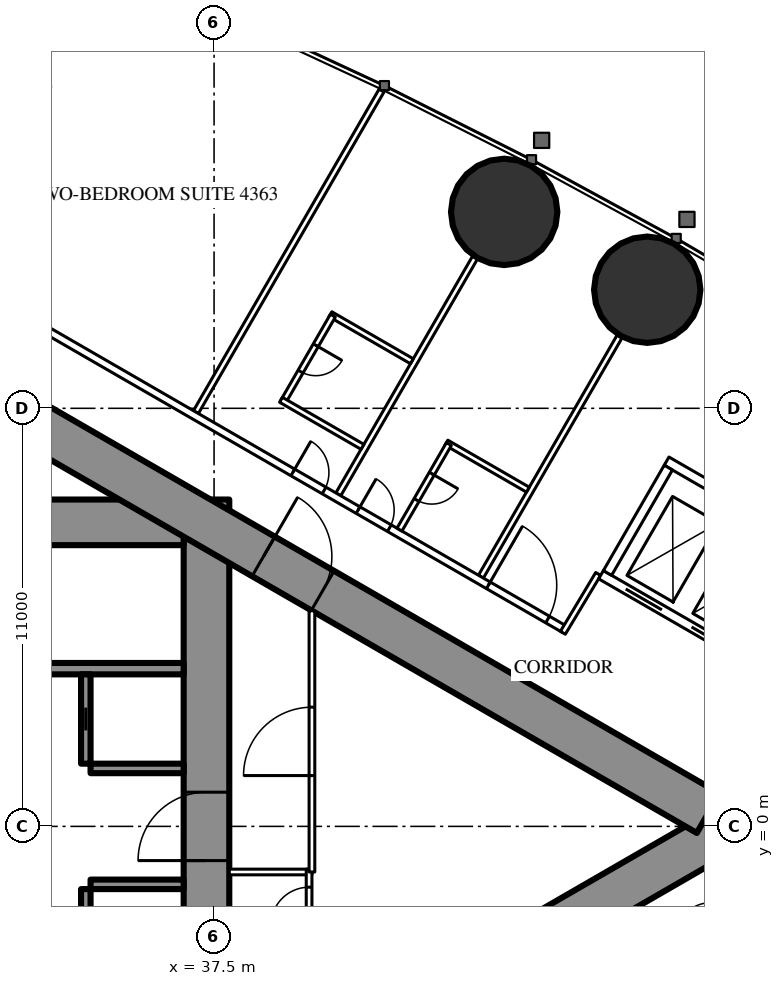
"""IFC4 building model, lengths in metres.
Left out: names, types, materials, properties, quantities, classifications, styles, units other than length and angle.
Written with IfcOpenShell. Run it as: python <this file> out.ifc"""

import sys

from ifc_helpers import new_model, si_unit, direction, frame, frame_2d, origin, origin_2d, place, context, subcontext, project, spatial, rectangle, circle, extrude, element, fill, save


model = new_model("IFC4")
c1 = context("Model", 3, precision=1e-05, world=origin(), true_north=direction((0.0, 1.0)))
c2 = subcontext(c1, "Body", "Model", "MODEL_VIEW")
j1 = project(units=[si_unit("LENGTHUNIT", "METRE"), si_unit("PLANEANGLEUNIT", "RADIAN")], contexts=[c1])
p1 = place(None, origin())
s1 = spatial("IfcSite", under=j1, at=p1, CompositionType="ELEMENT")
p2 = place(p1, origin())
s2 = spatial("IfcBuilding", under=s1, at=p2, CompositionType="ELEMENT")
p3 = place(p2, frame((0.0, 0.0, 163.3)))
s3 = spatial("IfcBuildingStorey", under=s2, at=p3, CompositionType="ELEMENT", Elevation=163.3)
for number, where, z_axis, x_axis in (
    (1, (48.897, 14.121, 0.0), (0.0, 0.0, 1.0), (1.0, 0.0, 0.0)),
    (2, (45.134, 16.168, 0.0), (0.0, 0.0, 1.0), (1.0, 0.0, 0.0)),
):
    element("IfcColumn", number, at=place(p3, frame(where, z_axis=z_axis, x_axis=x_axis)), inside=s3, PredefinedType="COLUMN", context=c2, shape_type="SweptSolid", body=[
        extrude(circle(Radius=1.4, at=origin_2d()), origin(), (0.0, 0.0, 1.0), 3.5),
    ])
p4 = place(p3, frame((37.3, -8.6, 0.0), z_axis=(0.0, 0.0, 1.0), x_axis=(0.0, 1.0, 0.0)))
e3 = element("IfcWall", 3, at=p4, inside=s3, PredefinedType="SHEAR", context=c2, shape_type="SweptSolid", body=[
    extrude(rectangle(XDim=17.2, YDim=1.2, at=frame_2d((8.6, 0.0))), origin(), (0.0, 0.0, 1.0), 3.5),
])
p5 = place(p4, frame((7.7, 0.0, 0.0)))
e4 = element("IfcOpeningElement", 4, at=p5, cuts=e3, PredefinedType="OPENING", context=c2, shape_type="SweptSolid", body=[
    extrude(rectangle(XDim=1.8, YDim=2.2, at=frame_2d((0.9, 1.1))), frame((0.0, 0.61, 0.0), z_axis=(0.0, -1.0, 0.0), x_axis=(1.0, 0.0, 0.0)), (0.0, 0.0, 1.0), 1.22),
])
p6 = place(p3, frame((28.3, 8.0, 0.0), z_axis=(0.0, 0.0, 1.0), x_axis=(1.0, 0.0, 0.0)))
e5 = element("IfcWall", 5, at=p6, inside=s3, PredefinedType="SHEAR", context=c2, shape_type="SweptSolid", body=[
    extrude(rectangle(XDim=8.4, YDim=1.2, at=frame_2d((4.2, 0.0))), origin(), (0.0, 0.0, 1.0), 3.5),
])
p7 = place(p6, frame((0.25, 0.0, 0.0)))
e6 = element("IfcOpeningElement", 6, at=p7, cuts=e5, PredefinedType="OPENING", context=c2, shape_type="SweptSolid", body=[
    extrude(rectangle(XDim=1.0, YDim=2.2, at=frame_2d((0.5, 1.1))), frame((0.0, 0.61, 0.0), z_axis=(0.0, -1.0, 0.0), x_axis=(1.0, 0.0, 0.0)), (0.0, 0.0, 1.0), 1.22),
])
p8 = place(p3, frame((28.3, 4.15, 0.0), z_axis=(0.0, 0.0, 1.0), x_axis=(1.0, 0.0, 0.0)))
e7 = element("IfcWall", 7, at=p8, inside=s3, PredefinedType="SHEAR", context=c2, shape_type="SweptSolid", body=[
    extrude(rectangle(XDim=8.4, YDim=0.3, at=frame_2d((4.2, 0.0))), origin(), (0.0, 0.0, 1.0), 3.5),
])
p9 = place(p3, frame((34.125, -4.0, 0.0), z_axis=(0.0, 0.0, 1.0), x_axis=(0.0, 1.0, 0.0)))
e8 = element("IfcWall", 8, at=p9, inside=s3, PredefinedType="SHEAR", context=c2, shape_type="SweptSolid", body=[
    extrude(rectangle(XDim=2.35, YDim=0.25, at=frame_2d((1.175, 0.0))), origin(), (0.0, 0.0, 1.0), 3.5),
])
p10 = place(p9, frame((0.875, 0.0, 0.0)))
e9 = element("IfcOpeningElement", 9, at=p10, cuts=e8, PredefinedType="OPENING", context=c2, shape_type="SweptSolid", body=[
    extrude(rectangle(XDim=0.6, YDim=2.0, at=frame_2d((0.3, 1.0))), frame((0.0, 0.135, 0.0), z_axis=(0.0, -1.0, 0.0), x_axis=(1.0, 0.0, 0.0)), (0.0, 0.0, 1.0), 0.27),
])
p11 = place(p3, frame((34.25, -1.525, 0.0), z_axis=(0.0, 0.0, 1.0), x_axis=(1.0, 0.0, 0.0)))
e10 = element("IfcWall", 10, at=p11, inside=s3, PredefinedType="SHEAR", context=c2, shape_type="SweptSolid", body=[
    extrude(rectangle(XDim=2.45, YDim=0.25, at=frame_2d((1.225, 0.0))), origin(), (0.0, 0.0, 1.0), 3.5),
])
p12 = place(p3, frame((34.125, 1.65, 0.0), z_axis=(0.0, 0.0, 1.0), x_axis=(0.0, 1.0, 0.0)))
e11 = element("IfcWall", 11, at=p12, inside=s3, PredefinedType="SHEAR", context=c2, shape_type="SweptSolid", body=[
    extrude(rectangle(XDim=2.35, YDim=0.25, at=frame_2d((1.175, 0.0))), origin(), (0.0, 0.0, 1.0), 3.5),
])
p13 = place(p12, frame((0.875, 0.0, 0.0)))
e12 = element("IfcOpeningElement", 12, at=p13, cuts=e11, PredefinedType="OPENING", context=c2, shape_type="SweptSolid", body=[
    extrude(rectangle(XDim=0.6, YDim=2.0, at=frame_2d((0.3, 1.0))), frame((0.0, 0.135, 0.0), z_axis=(0.0, -1.0, 0.0), x_axis=(1.0, 0.0, 0.0)), (0.0, 0.0, 1.0), 0.27),
])
p14 = place(p3, frame((34.25, 1.525, 0.0), z_axis=(0.0, 0.0, 1.0), x_axis=(1.0, 0.0, 0.0)))
e13 = element("IfcWall", 13, at=p14, inside=s3, PredefinedType="SHEAR", context=c2, shape_type="SweptSolid", body=[
    extrude(rectangle(XDim=2.45, YDim=0.25, at=frame_2d((1.225, 0.0))), origin(), (0.0, 0.0, 1.0), 3.5),
])
p15 = place(p3, frame((27.2, -13.8, 0.0), z_axis=(0.0, 0.0, 1.0), x_axis=(0.866027159892, 0.499996958321, 0.0)))
e14 = element("IfcWall", 14, at=p15, inside=s3, PredefinedType="SHEAR", context=c2, shape_type="SweptSolid", body=[
    extrude(rectangle(XDim=27.947, YDim=1.2, at=frame_2d((13.973, 0.0))), origin(), (0.0, 0.0, 1.0), 3.5),
])
p16 = place(p15, frame((4.6, 0.0, 0.0)))
e15 = element("IfcOpeningElement", 15, at=p16, cuts=e14, PredefinedType="OPENING", context=c2, shape_type="SweptSolid", body=[
    extrude(rectangle(XDim=1.0, YDim=2.2, at=frame_2d((0.5, 1.1))), frame((0.0, 0.61, 0.0), z_axis=(0.0, -1.0, 0.0), x_axis=(1.0, 0.0, 0.0)), (0.0, 0.0, 1.0), 1.22),
])
p17 = place(p15, frame((13.395, 0.0, 0.0)))
e16 = element("IfcOpeningElement", 16, at=p17, cuts=e14, PredefinedType="OPENING", context=c2, shape_type="SweptSolid", body=[
    extrude(rectangle(XDim=1.8, YDim=2.2, at=frame_2d((0.9, 1.1))), frame((0.0, 0.61, 0.0), z_axis=(0.0, -1.0, 0.0), x_axis=(1.0, 0.0, 0.0)), (0.0, 0.0, 1.0), 1.22),
])
p18 = place(p3, frame((27.2, 13.8, 0.0), z_axis=(0.0, 0.0, 1.0), x_axis=(0.866024515034, -0.500001539357, 0.0)))
e17 = element("IfcWall", 17, at=p18, inside=s3, PredefinedType="SHEAR", context=c2, shape_type="SweptSolid", body=[
    extrude(rectangle(XDim=26.907, YDim=1.2, at=frame_2d((13.454, 0.0))), origin(), (0.0, 0.0, 1.0), 3.5),
])
p19 = place(p18, frame((4.6, 0.0, 0.0)))
e18 = element("IfcOpeningElement", 18, at=p19, cuts=e17, PredefinedType="OPENING", context=c2, shape_type="SweptSolid", body=[
    extrude(rectangle(XDim=1.0, YDim=2.2, at=frame_2d((0.5, 1.1))), frame((0.0, 0.61, 0.0), z_axis=(0.0, -1.0, 0.0), x_axis=(1.0, 0.0, 0.0)), (0.0, 0.0, 1.0), 1.22),
])
p20 = place(p18, frame((13.395, 0.0, 0.0)))
e19 = element("IfcOpeningElement", 19, at=p20, cuts=e17, PredefinedType="OPENING", context=c2, shape_type="SweptSolid", body=[
    extrude(rectangle(XDim=1.8, YDim=2.2, at=frame_2d((0.9, 1.1))), frame((0.0, 0.61, 0.0), z_axis=(0.0, -1.0, 0.0), x_axis=(1.0, 0.0, 0.0)), (0.0, 0.0, 1.0), 1.22),
])
p21 = place(p3, frame((37.022, 10.9, 0.0), z_axis=(0.0, 0.0, 1.0), x_axis=(0.499998620953, 0.866026199976, 0.0)))
e20 = element("IfcWall", 20, at=p21, inside=s3, PredefinedType="PARTITIONING", context=c2, shape_type="SweptSolid", body=[
    extrude(rectangle(XDim=9.77, YDim=0.15, at=frame_2d((4.885, 0.0))), origin(), (0.0, 0.0, 1.0), 3.25),
])
p22 = place(p3, frame((40.769, 8.737, 0.0), z_axis=(0.0, 0.0, 1.0), x_axis=(0.500013115284, 0.866017831539, 0.0)))
e21 = element("IfcWall", 21, at=p22, inside=s3, PredefinedType="PARTITIONING", context=c2, shape_type="SweptSolid", body=[
    extrude(rectangle(XDim=7.198, YDim=0.15, at=frame_2d((3.599, 0.0))), origin(), (0.0, 0.0, 1.0), 2.3),
])
p23 = place(p3, frame((44.521, 6.571, 0.0), z_axis=(0.0, 0.0, 1.0), x_axis=(0.500020376429, 0.866013639128, 0.0)))
e22 = element("IfcWall", 22, at=p23, inside=s3, PredefinedType="PARTITIONING", context=c2, shape_type="SweptSolid", body=[
    extrude(rectangle(XDim=7.306, YDim=0.15, at=frame_2d((3.653, 0.0))), origin(), (0.0, 0.0, 1.0), 2.3),
])
p24 = place(p3, frame((27.959, 16.017, 0.0), z_axis=(0.0, 0.0, 1.0), x_axis=(0.866027146794, -0.499996981007, 0.0)))
e23 = element("IfcWall", 23, at=p24, inside=s3, PredefinedType="PARTITIONING", context=c2, shape_type="SweptSolid", body=[
    extrude(rectangle(XDim=21.657, YDim=0.2, at=frame_2d((10.829, 0.0))), origin(), (0.0, 0.0, 1.0), 3.25),
])
p25 = place(p24, frame((15.391, 0.0, 0.0)))
e24 = element("IfcOpeningElement", 24, at=p25, cuts=e23, PredefinedType="OPENING", context=c2, shape_type="SweptSolid", body=[
    extrude(rectangle(XDim=0.95, YDim=2.2, at=frame_2d((0.475, 1.1))), frame((0.0, 0.11, 0.0), z_axis=(0.0, -1.0, 0.0), x_axis=(1.0, 0.0, 0.0)), (0.0, 0.0, 1.0), 0.22),
])
p26 = place(p24, frame((13.409, 0.0, 0.0)))
e25 = element("IfcOpeningElement", 25, at=p26, cuts=e23, PredefinedType="OPENING", context=c2, shape_type="SweptSolid", body=[
    extrude(rectangle(XDim=0.95, YDim=2.2, at=frame_2d((0.475, 1.1))), frame((0.0, 0.11, 0.0), z_axis=(0.0, -1.0, 0.0), x_axis=(1.0, 0.0, 0.0)), (0.0, 0.0, 1.0), 0.22),
])
p27 = place(p24, frame((0.6, 0.0, 0.0)))
e26 = element("IfcOpeningElement", 26, at=p27, cuts=e23, PredefinedType="OPENING", context=c2, shape_type="SweptSolid", body=[
    extrude(rectangle(XDim=0.95, YDim=2.2, at=frame_2d((0.475, 1.1))), frame((0.0, 0.11, 0.0), z_axis=(0.0, -1.0, 0.0), x_axis=(1.0, 0.0, 0.0)), (0.0, 0.0, 1.0), 0.22),
])
p28 = place(p24, frame((19.349, 0.0, 0.0)))
e27 = element("IfcOpeningElement", 27, at=p28, cuts=e23, PredefinedType="OPENING", context=c2, shape_type="SweptSolid", body=[
    extrude(rectangle(XDim=1.8, YDim=2.2, at=frame_2d((0.9, 1.1))), frame((0.0, 0.11, 0.0), z_axis=(0.0, -1.0, 0.0), x_axis=(1.0, 0.0, 0.0)), (0.0, 0.0, 1.0), 0.22),
])
p29 = place(p3, frame((47.606, 6.643, 0.0), z_axis=(0.0, 0.0, 1.0), x_axis=(-0.514237157483, -0.857648031458, 0.0)))
e28 = element("IfcWall", 28, at=p29, inside=s3, PredefinedType="PARTITIONING", context=c2, shape_type="SweptSolid", body=[
    extrude(rectangle(XDim=1.805, YDim=0.15, at=frame_2d((0.902, 0.0))), origin(), (0.0, 0.0, 1.0), 3.25),
])
p30 = place(p3, frame((40.741, -8.638, 0.0), z_axis=(0.0, 0.0, 1.0), x_axis=(0.866022967338, 0.500004220025, 0.0)))
e29 = element("IfcWall", 29, at=p30, inside=s3, PredefinedType="PARTITIONING", context=c2, shape_type="SweptSolid", body=[
    extrude(rectangle(XDim=17.276, YDim=0.2, at=frame_2d((8.638, 0.0))), origin(), (0.0, 0.0, 1.0), 3.25),
])
p31 = place(p30, frame((7.316, 0.0, 0.0)))
e30 = element("IfcOpeningElement", 30, at=p31, cuts=e29, PredefinedType="OPENING", context=c2, shape_type="SweptSolid", body=[
    extrude(rectangle(XDim=0.95, YDim=2.2, at=frame_2d((0.475, 1.1))), frame((0.0, 0.11, 0.0), z_axis=(0.0, -1.0, 0.0), x_axis=(1.0, 0.0, 0.0)), (0.0, 0.0, 1.0), 0.22),
])
p32 = place(p30, frame((11.366, 0.0, 0.0)))
e31 = element("IfcOpeningElement", 31, at=p32, cuts=e29, PredefinedType="OPENING", context=c2, shape_type="SweptSolid", body=[
    extrude(rectangle(XDim=0.95, YDim=2.2, at=frame_2d((0.475, 1.1))), frame((0.0, 0.11, 0.0), z_axis=(0.0, -1.0, 0.0), x_axis=(1.0, 0.0, 0.0)), (0.0, 0.0, 1.0), 0.22),
])
p33 = place(p30, frame((13.347, 0.0, 0.0)))
e32 = element("IfcOpeningElement", 32, at=p33, cuts=e29, PredefinedType="OPENING", context=c2, shape_type="SweptSolid", body=[
    extrude(rectangle(XDim=0.95, YDim=2.2, at=frame_2d((0.475, 1.1))), frame((0.0, 0.11, 0.0), z_axis=(0.0, -1.0, 0.0), x_axis=(1.0, 0.0, 0.0)), (0.0, 0.0, 1.0), 0.22),
])
p34 = place(p3, frame((43.613, 10.097, 0.0), z_axis=(0.0, 0.0, 1.0), x_axis=(0.866031185235, -0.4999899861, 0.0)))
e33 = element("IfcWall", 33, at=p34, inside=s3, PredefinedType="PARTITIONING", context=c2, shape_type="SweptSolid", body=[
    extrude(rectangle(XDim=2.475, YDim=0.15, at=frame_2d((1.238, 0.0))), origin(), (0.0, 0.0, 1.0), 3.25),
])
p35 = place(p3, frame((42.378, 7.808, 0.0), z_axis=(0.0, 0.0, 1.0), x_axis=(0.500006934395, 0.866021400173, 0.0)))
e34 = element("IfcWall", 34, at=p35, inside=s3, PredefinedType="PARTITIONING", context=c2, shape_type="SweptSolid", body=[
    extrude(rectangle(XDim=2.6, YDim=0.15, at=frame_2d((1.3, 0.0))), origin(), (0.0, 0.0, 1.0), 3.25),
])
p36 = place(p35, frame((0.9, 0.0, 0.0)))
e35 = element("IfcOpeningElement", 35, at=p36, cuts=e34, PredefinedType="OPENING", context=c2, shape_type="SweptSolid", body=[
    extrude(rectangle(XDim=0.8, YDim=2.2, at=frame_2d((0.4, 1.1))), frame((0.0, 0.085, 0.0), z_axis=(0.0, -1.0, 0.0), x_axis=(1.0, 0.0, 0.0)), (0.0, 0.0, 1.0), 0.17),
])
p37 = place(p3, frame((40.561, 13.476, 0.0), z_axis=(0.0, 0.0, 1.0), x_axis=(0.866006523861, -0.500032699561, 0.0)))
e36 = element("IfcWall", 36, at=p37, inside=s3, PredefinedType="PARTITIONING", context=c2, shape_type="SweptSolid", body=[
    extrude(rectangle(XDim=2.475, YDim=0.15, at=frame_2d((1.237, 0.0))), origin(), (0.0, 0.0, 1.0), 3.25),
])
p38 = place(p3, frame((39.326, 11.187, 0.0), z_axis=(0.0, 0.0, 1.0), x_axis=(0.500047596559, 0.865997922154, 0.0)))
e37 = element("IfcWall", 37, at=p38, inside=s3, PredefinedType="PARTITIONING", context=c2, shape_type="SweptSolid", body=[
    extrude(rectangle(XDim=2.6, YDim=0.15, at=frame_2d((1.3, 0.0))), origin(), (0.0, 0.0, 1.0), 3.25),
])
p39 = place(p38, frame((0.9, 0.0, 0.0)))
e38 = element("IfcOpeningElement", 38, at=p39, cuts=e37, PredefinedType="OPENING", context=c2, shape_type="SweptSolid", body=[
    extrude(rectangle(XDim=0.8, YDim=2.2, at=frame_2d((0.4, 1.1))), frame((0.0, 0.085, 0.0), z_axis=(0.0, -1.0, 0.0), x_axis=(1.0, 0.0, 0.0)), (0.0, 0.0, 1.0), 0.17),
])
p40 = place(p3, frame((39.261, 11.224, 0.0), z_axis=(0.0, 0.0, 1.0), x_axis=(0.866006523861, -0.500032699561, 0.0)))
e39 = element("IfcWall", 39, at=p40, inside=s3, PredefinedType="PARTITIONING", context=c2, shape_type="SweptSolid", body=[
    extrude(rectangle(XDim=2.475, YDim=0.15, at=frame_2d((1.237, 0.0))), origin(), (0.0, 0.0, 1.0), 3.25),
])
p41 = place(p3, frame((37.9, -1.2, 0.0), z_axis=(0.0, 0.0, 1.0), x_axis=(1.0, 0.0, 0.0)))
e40 = element("IfcWall", 40, at=p41, inside=s3, PredefinedType="PARTITIONING", context=c2, shape_type="SweptSolid", body=[
    extrude(rectangle(XDim=2.175, YDim=0.15, at=frame_2d((1.087, 0.0))), origin(), (0.0, 0.0, 1.0), 3.25),
])
p42 = place(p3, frame((40.0, -3.075, 0.0), z_axis=(0.0, 0.0, 1.0), x_axis=(0.0, 1.0, 0.0)))
e41 = element("IfcWall", 41, at=p42, inside=s3, PredefinedType="PARTITIONING", context=c2, shape_type="SweptSolid", body=[
    extrude(rectangle(XDim=1.95, YDim=0.15, at=frame_2d((0.975, 0.0))), origin(), (0.0, 0.0, 1.0), 3.25),
])
p43 = place(p42, frame((0.475, 0.0, 0.0)))
e42 = element("IfcOpeningElement", 42, at=p43, cuts=e41, PredefinedType="OPENING", context=c2, shape_type="SweptSolid", body=[
    extrude(rectangle(XDim=1.0, YDim=2.2, at=frame_2d((0.5, 1.1))), frame((0.0, 0.085, 0.0), z_axis=(0.0, -1.0, 0.0), x_axis=(1.0, 0.0, 0.0)), (0.0, 0.0, 1.0), 0.17),
])
p44 = place(p3, frame((40.075, -1.2, 0.0), z_axis=(0.0, 0.0, 1.0), x_axis=(0.0, 1.0, 0.0)))
e43 = element("IfcWall", 43, at=p44, inside=s3, PredefinedType="PARTITIONING", context=c2, shape_type="SweptSolid", body=[
    extrude(rectangle(XDim=6.874, YDim=0.15, at=frame_2d((3.437, 0.0))), origin(), (0.0, 0.0, 1.0), 3.25),
])
p45 = place(p44, frame((2.537, 0.0, 0.0)))
e44 = element("IfcOpeningElement", 44, at=p45, cuts=e43, PredefinedType="OPENING", context=c2, shape_type="SweptSolid", body=[
    extrude(rectangle(XDim=1.8, YDim=2.2, at=frame_2d((0.9, 1.1))), frame((0.0, 0.085, 0.0), z_axis=(0.0, -1.0, 0.0), x_axis=(1.0, 0.0, 0.0)), (0.0, 0.0, 1.0), 0.17),
])
p46 = place(p3, frame((47.681, 6.622, 0.0), z_axis=(0.0, 0.0, 1.0), x_axis=(0.86603344179, -0.499986077507, 0.0)))
e45 = element("IfcWall", 45, at=p46, inside=s3, PredefinedType="PARTITIONING", context=c2, shape_type="SweptSolid", body=[
    extrude(rectangle(XDim=6.6, YDim=0.25, at=frame_2d((3.3, 0.0))), origin(), (0.0, 0.0, 1.0), 3.25),
])
p47 = place(p46, frame((0.75, 0.0, 0.0)))
e46 = element("IfcOpeningElement", 46, at=p47, cuts=e45, PredefinedType="OPENING", context=c2, shape_type="SweptSolid", body=[
    extrude(rectangle(XDim=1.1, YDim=2.2, at=frame_2d((0.55, 1.1))), frame((0.0, 0.135, 0.0), z_axis=(0.0, -1.0, 0.0), x_axis=(1.0, 0.0, 0.0)), (0.0, 0.0, 1.0), 0.27),
])
p48 = place(p46, frame((2.75, 0.0, 0.0)))
e47 = element("IfcOpeningElement", 47, at=p48, cuts=e45, PredefinedType="OPENING", context=c2, shape_type="SweptSolid", body=[
    extrude(rectangle(XDim=1.1, YDim=2.2, at=frame_2d((0.55, 1.1))), frame((0.0, 0.135, 0.0), z_axis=(0.0, -1.0, 0.0), x_axis=(1.0, 0.0, 0.0)), (0.0, 0.0, 1.0), 0.27),
])
p49 = place(p46, frame((4.75, 0.0, 0.0)))
e48 = element("IfcOpeningElement", 48, at=p49, cuts=e45, PredefinedType="OPENING", context=c2, shape_type="SweptSolid", body=[
    extrude(rectangle(XDim=1.1, YDim=2.2, at=frame_2d((0.55, 1.1))), frame((0.0, 0.135, 0.0), z_axis=(0.0, -1.0, 0.0), x_axis=(1.0, 0.0, 0.0)), (0.0, 0.0, 1.0), 0.27),
])
p50 = place(p3, frame((49.406, 9.611, 0.0), z_axis=(0.0, 0.0, 1.0), x_axis=(0.86603344179, -0.499986077507, 0.0)))
e49 = element("IfcWall", 49, at=p50, inside=s3, PredefinedType="PARTITIONING", context=c2, shape_type="SweptSolid", body=[
    extrude(rectangle(XDim=6.6, YDim=0.25, at=frame_2d((3.3, 0.0))), origin(), (0.0, 0.0, 1.0), 3.25),
])
p51 = place(p3, frame((47.852, 6.668, 0.0), z_axis=(0.0, 0.0, 1.0), x_axis=(0.499929347863, 0.866066190972, 0.0)))
e50 = element("IfcWall", 50, at=p51, inside=s3, PredefinedType="PARTITIONING", context=c2, shape_type="SweptSolid", body=[
    extrude(rectangle(XDim=3.201, YDim=0.25, at=frame_2d((1.6, 0.0))), origin(), (0.0, 0.0, 1.0), 3.25),
])
p52 = place(p36, origin())
e51 = element("IfcDoor", 51, at=p52, inside=s3, OperationType="SINGLE_SWING_RIGHT", PredefinedType="DOOR", context=c2, shape_type="SweptSolid", body=[
    extrude(rectangle(XDim=0.8, YDim=2.2, at=frame_2d((0.4, 1.1))), frame((0.0, 0.025, 0.0), z_axis=(0.0, -1.0, 0.0), x_axis=(1.0, 0.0, 0.0)), (0.0, 0.0, 1.0), 0.05),
])
fill(e35, e51)
p53 = place(p25, origin())
e52 = element("IfcDoor", 52, at=p53, inside=s3, OperationType="SINGLE_SWING_LEFT", PredefinedType="DOOR", context=c2, shape_type="SweptSolid", body=[
    extrude(rectangle(XDim=0.95, YDim=2.2, at=frame_2d((0.475, 1.1))), frame((0.0, 0.025, 0.0), z_axis=(0.0, -1.0, 0.0), x_axis=(1.0, 0.0, 0.0)), (0.0, 0.0, 1.0), 0.05),
])
fill(e24, e52)
p54 = place(p39, origin())
e53 = element("IfcDoor", 53, at=p54, inside=s3, OperationType="SINGLE_SWING_RIGHT", PredefinedType="DOOR", context=c2, shape_type="SweptSolid", body=[
    extrude(rectangle(XDim=0.8, YDim=2.2, at=frame_2d((0.4, 1.1))), frame((0.0, 0.025, 0.0), z_axis=(0.0, -1.0, 0.0), x_axis=(1.0, 0.0, 0.0)), (0.0, 0.0, 1.0), 0.05),
])
fill(e38, e53)
p55 = place(p26, origin())
e54 = element("IfcDoor", 54, at=p55, inside=s3, OperationType="SINGLE_SWING_LEFT", PredefinedType="DOOR", context=c2, shape_type="SweptSolid", body=[
    extrude(rectangle(XDim=0.95, YDim=2.2, at=frame_2d((0.475, 1.1))), frame((0.0, 0.025, 0.0), z_axis=(0.0, -1.0, 0.0), x_axis=(1.0, 0.0, 0.0)), (0.0, 0.0, 1.0), 0.05),
])
fill(e25, e54)
p56 = place(p28, origin())
e55 = element("IfcDoor", 55, at=p56, inside=s3, OperationType="DOUBLE_DOOR_SINGLE_SWING", PredefinedType="DOOR", context=c2, shape_type="SweptSolid", body=[
    extrude(rectangle(XDim=1.8, YDim=2.2, at=frame_2d((0.9, 1.1))), frame((0.0, 0.025, 0.0), z_axis=(0.0, -1.0, 0.0), x_axis=(1.0, 0.0, 0.0)), (0.0, 0.0, 1.0), 0.05),
])
fill(e27, e55)
p57 = place(p43, origin())
e56 = element("IfcDoor", 56, at=p57, inside=s3, OperationType="SINGLE_SWING_LEFT", PredefinedType="DOOR", context=c2, shape_type="SweptSolid", body=[
    extrude(rectangle(XDim=1.0, YDim=2.2, at=frame_2d((0.5, 1.1))), frame((0.0, 0.025, 0.0), z_axis=(0.0, -1.0, 0.0), x_axis=(1.0, 0.0, 0.0)), (0.0, 0.0, 1.0), 0.05),
])
fill(e42, e56)
p58 = place(p45, origin())
e57 = element("IfcDoor", 57, at=p58, inside=s3, OperationType="DOUBLE_DOOR_SINGLE_SWING", PredefinedType="DOOR", context=c2, shape_type="SweptSolid", body=[
    extrude(rectangle(XDim=1.8, YDim=2.2, at=frame_2d((0.9, 1.1))), frame((0.0, 0.025, 0.0), z_axis=(0.0, -1.0, 0.0), x_axis=(1.0, 0.0, 0.0)), (0.0, 0.0, 1.0), 0.05),
])
fill(e44, e57)
p59 = place(p20, origin())
e58 = element("IfcDoor", 58, at=p59, inside=s3, OperationType="DOUBLE_DOOR_SINGLE_SWING", PredefinedType="DOOR", context=c2, shape_type="SweptSolid", body=[
    extrude(rectangle(XDim=1.8, YDim=2.2, at=frame_2d((0.9, 1.1))), frame((0.0, 0.025, 0.0), z_axis=(0.0, -1.0, 0.0), x_axis=(1.0, 0.0, 0.0)), (0.0, 0.0, 1.0), 0.05),
])
fill(e19, e58)
p60 = place(p5, origin())
e59 = element("IfcDoor", 59, at=p60, inside=s3, OperationType="DOUBLE_DOOR_SINGLE_SWING", PredefinedType="DOOR", context=c2, shape_type="SweptSolid", body=[
    extrude(rectangle(XDim=1.8, YDim=2.2, at=frame_2d((0.9, 1.1))), frame((0.0, 0.025, 0.0), z_axis=(0.0, -1.0, 0.0), x_axis=(1.0, 0.0, 0.0)), (0.0, 0.0, 1.0), 0.05),
])
fill(e4, e59)
p61 = place(p13, origin())
e60 = element("IfcDoor", 60, at=p61, inside=s3, OperationType="SLIDING_TO_LEFT", PredefinedType="DOOR", context=c2, shape_type="SweptSolid", body=[
    extrude(rectangle(XDim=0.6, YDim=2.0, at=frame_2d((0.3, 1.0))), frame((0.0, 0.025, 0.0), z_axis=(0.0, -1.0, 0.0), x_axis=(1.0, 0.0, 0.0)), (0.0, 0.0, 1.0), 0.05),
])
fill(e12, e60)
p62 = place(p47, origin())
e61 = element("IfcDoor", 61, at=p62, inside=s3, OperationType="DOUBLE_DOOR_SLIDING", PredefinedType="USERDEFINED", context=c2, shape_type="SweptSolid", body=[
    extrude(rectangle(XDim=1.1, YDim=2.2, at=frame_2d((0.55, 1.1))), frame((0.0, 0.025, 0.0), z_axis=(0.0, -1.0, 0.0), x_axis=(1.0, 0.0, 0.0)), (0.0, 0.0, 1.0), 0.05),
])
fill(e46, e61)
p63 = place(p48, origin())
e62 = element("IfcDoor", 62, at=p63, inside=s3, OperationType="DOUBLE_DOOR_SLIDING", PredefinedType="USERDEFINED", context=c2, shape_type="SweptSolid", body=[
    extrude(rectangle(XDim=1.1, YDim=2.2, at=frame_2d((0.55, 1.1))), frame((0.0, 0.025, 0.0), z_axis=(0.0, -1.0, 0.0), x_axis=(1.0, 0.0, 0.0)), (0.0, 0.0, 1.0), 0.05),
])
fill(e47, e62)
save(model, sys.argv[1])
